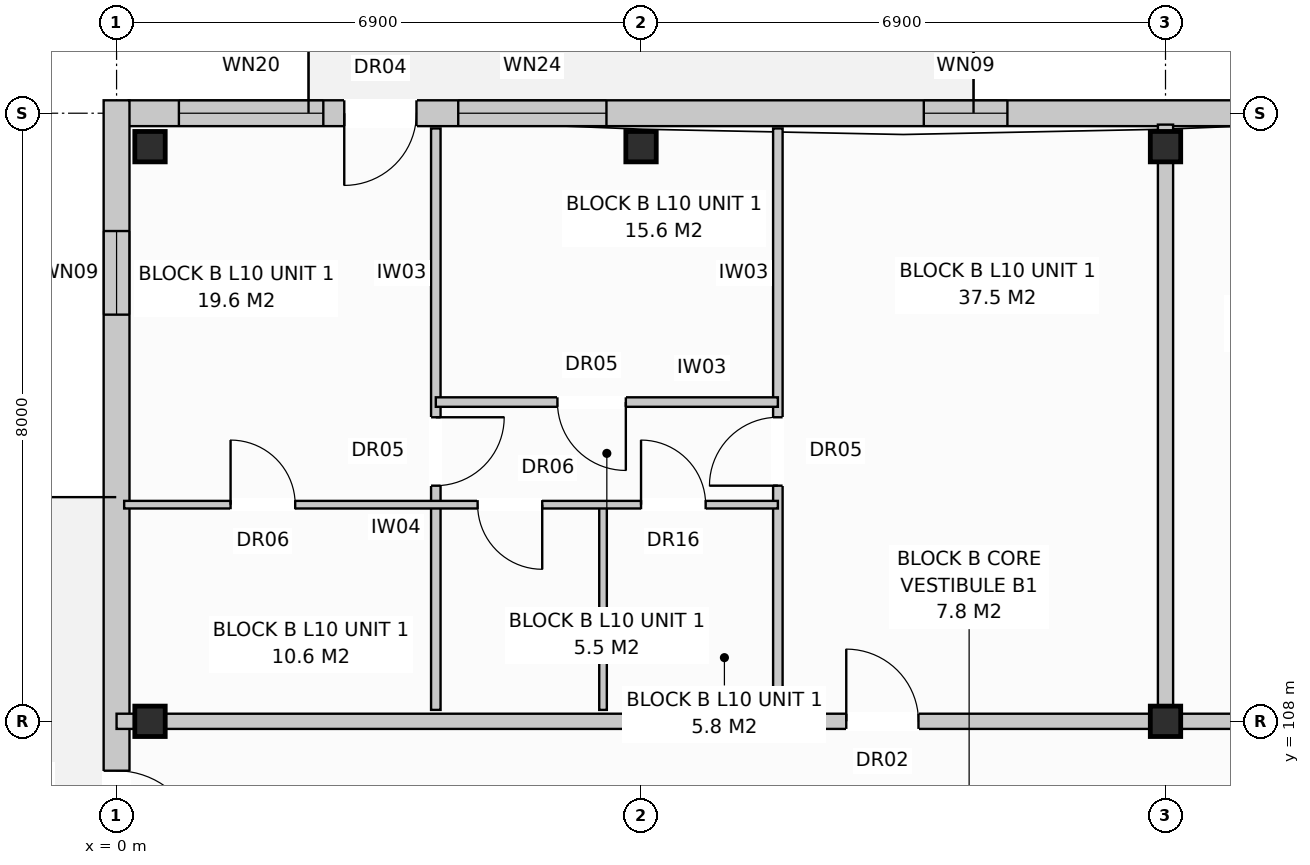
"""IFC4 building model, lengths in metres.
Left out: names, types, materials, properties, quantities, classifications, styles, units other than length and angle.
Written with IfcOpenShell. Run it as: python <this file> out.ifc"""

import sys

from ifc_helpers import new_model, si_unit, direction, frame, frame_2d, origin, origin_with_axes, origin_2d, place, context, subcontext, project, spatial, rectangle, extrude, element, fill, save


model = new_model("IFC4")
c1 = context("Model", 3, precision=1e-05, world=origin(), true_north=direction((0.0, 1.0)))
c2 = subcontext(c1, "Body", "Model", "MODEL_VIEW")
j1 = project(units=[si_unit("LENGTHUNIT", "METRE"), si_unit("PLANEANGLEUNIT", "RADIAN")], contexts=[c1])
p1 = place(None, origin())
s1 = spatial("IfcSite", under=j1, at=p1, CompositionType="ELEMENT")
p2 = place(p1, origin())
s2 = spatial("IfcBuilding", under=s1, at=p2, CompositionType="ELEMENT")
p3 = place(p2, frame((0.0, 0.0, 33.6)))
s3 = spatial("IfcBuildingStorey", under=s2, at=p3, CompositionType="ELEMENT", Elevation=33.6)
for number, where, z_axis, x_axis in (
    (1, (0.44, 108.0, 0.0), (0.0, 0.0, 1.0), (1.0, 0.0, 0.0)),
    (2, (0.44, 115.56, 0.0), (0.0, 0.0, 1.0), (1.0, 0.0, 0.0)),
    (3, (6.9, 108.0, 0.0), (0.0, 0.0, 1.0), (1.0, 0.0, 0.0)),
    (4, (6.9, 115.56, 0.0), (0.0, 0.0, 1.0), (1.0, 0.0, 0.0)),
    (5, (13.8, 108.0, 0.0), (0.0, 0.0, 1.0), (1.0, 0.0, 0.0)),
    (6, (13.8, 115.56, 0.0), (0.0, 0.0, 1.0), (1.0, 0.0, 0.0)),
):
    element("IfcColumn", number, at=place(p3, frame(where, z_axis=z_axis, x_axis=x_axis)), inside=s3, PredefinedType="COLUMN", context=c2, shape_type="SweptSolid", body=[
        extrude(rectangle(XDim=0.4, YDim=0.4, at=origin_2d()), origin(), (0.0, 0.0, 1.0), 3.2),
    ])
p4 = place(p3, frame((0.16, 116.0, 0.0), z_axis=(0.0, 0.0, 1.0), x_axis=(1.0, 0.0, 0.0)))
e7 = element("IfcWall", 7, at=p4, inside=s3, PredefinedType="STANDARD", context=c2, shape_type="SweptSolid", body=[
    extrude(rectangle(XDim=41.08, YDim=0.34, at=frame_2d((20.54, 0.0))), origin(), (0.0, 0.0, 1.0), 2.96),
])
p5 = place(p4, frame((2.835, 0.0, 0.0)))
e8 = element("IfcOpeningElement", 8, at=p5, cuts=e7, PredefinedType="OPENING", context=c2, shape_type="SweptSolid", body=[
    extrude(rectangle(XDim=0.95, YDim=2.1, at=frame_2d((0.475, 1.05))), frame((0.0, 0.182, 0.0), z_axis=(0.0, -1.0, 0.0), x_axis=(1.0, 0.0, 0.0)), (0.0, 0.0, 1.0), 0.364),
])
p6 = place(p4, frame((17.635, 0.0, 0.0)))
e9 = element("IfcOpeningElement", 9, at=p6, cuts=e7, PredefinedType="OPENING", context=c2, shape_type="SweptSolid", body=[
    extrude(rectangle(XDim=0.95, YDim=2.1, at=frame_2d((0.475, 1.05))), frame((0.0, 0.182, 0.0), z_axis=(0.0, -1.0, 0.0), x_axis=(1.0, 0.0, 0.0)), (0.0, 0.0, 1.0), 0.364),
])
p7 = place(p4, frame((30.135, 0.0, 0.0)))
e10 = element("IfcOpeningElement", 10, at=p7, cuts=e7, PredefinedType="OPENING", context=c2, shape_type="SweptSolid", body=[
    extrude(rectangle(XDim=0.95, YDim=2.1, at=frame_2d((0.475, 1.05))), frame((0.0, 0.182, 0.0), z_axis=(0.0, -1.0, 0.0), x_axis=(1.0, 0.0, 0.0)), (0.0, 0.0, 1.0), 0.364),
])
p8 = place(p4, frame((0.66, 0.0, 0.8)))
e11 = element("IfcOpeningElement", 11, at=p8, cuts=e7, PredefinedType="OPENING", context=c2, shape_type="SweptSolid", body=[
    extrude(rectangle(XDim=1.9, YDim=1.85, at=frame_2d((0.95, 0.925))), frame((0.0, 0.182, 0.0), z_axis=(0.0, -1.0, 0.0), x_axis=(1.0, 0.0, 0.0)), (0.0, 0.0, 1.0), 0.364),
])
p9 = place(p4, frame((4.335, 0.0, 0.8)))
e12 = element("IfcOpeningElement", 12, at=p9, cuts=e7, PredefinedType="OPENING", context=c2, shape_type="SweptSolid", body=[
    extrude(rectangle(XDim=1.95, YDim=1.65, at=frame_2d((0.975, 0.825))), frame((0.0, 0.182, 0.0), z_axis=(0.0, -1.0, 0.0), x_axis=(1.0, 0.0, 0.0)), (0.0, 0.0, 1.0), 0.364),
])
p10 = place(p4, frame((10.46, 0.0, 0.72)))
e13 = element("IfcOpeningElement", 13, at=p10, cuts=e7, PredefinedType="OPENING", context=c2, shape_type="SweptSolid", body=[
    extrude(rectangle(XDim=1.1, YDim=1.5, at=frame_2d((0.55, 0.75))), frame((0.0, 0.182, 0.0), z_axis=(0.0, -1.0, 0.0), x_axis=(1.0, 0.0, 0.0)), (0.0, 0.0, 1.0), 0.364),
])
p11 = place(p4, frame((15.76, 0.0, 0.72)))
e14 = element("IfcOpeningElement", 14, at=p11, cuts=e7, PredefinedType="OPENING", context=c2, shape_type="SweptSolid", body=[
    extrude(rectangle(XDim=1.1, YDim=1.5, at=frame_2d((0.55, 0.75))), frame((0.0, 0.182, 0.0), z_axis=(0.0, -1.0, 0.0), x_axis=(1.0, 0.0, 0.0)), (0.0, 0.0, 1.0), 0.364),
])
p12 = place(p4, frame((20.992, 0.0, 0.8)))
e15 = element("IfcOpeningElement", 15, at=p12, cuts=e7, PredefinedType="OPENING", context=c2, shape_type="SweptSolid", body=[
    extrude(rectangle(XDim=1.95, YDim=1.65, at=frame_2d((0.975, 0.825))), frame((0.0, 0.182, 0.0), z_axis=(0.0, -1.0, 0.0), x_axis=(1.0, 0.0, 0.0)), (0.0, 0.0, 1.0), 0.364),
])
p13 = place(p4, frame((24.66, 0.0, 0.72)))
e16 = element("IfcOpeningElement", 16, at=p13, cuts=e7, PredefinedType="OPENING", context=c2, shape_type="SweptSolid", body=[
    extrude(rectangle(XDim=1.1, YDim=1.5, at=frame_2d((0.55, 0.75))), frame((0.0, 0.182, 0.0), z_axis=(0.0, -1.0, 0.0), x_axis=(1.0, 0.0, 0.0)), (0.0, 0.0, 1.0), 0.364),
])
p14 = place(p4, frame((27.96, 0.0, 0.8)))
e17 = element("IfcOpeningElement", 17, at=p14, cuts=e7, PredefinedType="OPENING", context=c2, shape_type="SweptSolid", body=[
    extrude(rectangle(XDim=1.9, YDim=1.85, at=frame_2d((0.95, 0.925))), frame((0.0, 0.182, 0.0), z_axis=(0.0, -1.0, 0.0), x_axis=(1.0, 0.0, 0.0)), (0.0, 0.0, 1.0), 0.364),
])
p15 = place(p4, frame((31.835, 0.0, 0.8)))
e18 = element("IfcOpeningElement", 18, at=p15, cuts=e7, PredefinedType="OPENING", context=c2, shape_type="SweptSolid", body=[
    extrude(rectangle(XDim=1.95, YDim=1.65, at=frame_2d((0.975, 0.825))), frame((0.0, 0.182, 0.0), z_axis=(0.0, -1.0, 0.0), x_axis=(1.0, 0.0, 0.0)), (0.0, 0.0, 1.0), 0.364),
])
p16 = place(p4, frame((35.41, 0.0, 0.8)))
e19 = element("IfcOpeningElement", 19, at=p16, cuts=e7, PredefinedType="OPENING", context=c2, shape_type="SweptSolid", body=[
    extrude(rectangle(XDim=1.8, YDim=1.7, at=frame_2d((0.9, 0.85))), frame((0.0, 0.182, 0.0), z_axis=(0.0, -1.0, 0.0), x_axis=(1.0, 0.0, 0.0)), (0.0, 0.0, 1.0), 0.364),
])
p17 = place(p4, frame((38.575, 0.0, 0.8)))
e20 = element("IfcOpeningElement", 20, at=p17, cuts=e7, PredefinedType="OPENING", context=c2, shape_type="SweptSolid", body=[
    extrude(rectangle(XDim=1.9, YDim=1.85, at=frame_2d((0.95, 0.925))), frame((0.0, 0.182, 0.0), z_axis=(0.0, -1.0, 0.0), x_axis=(1.0, 0.0, 0.0)), (0.0, 0.0, 1.0), 0.364),
])
p18 = place(p3, frame((0.0, 97.43, 0.0), z_axis=(0.0, 0.0, 1.0), x_axis=(0.0, 1.0, 0.0)))
e21 = element("IfcWall", 21, at=p18, inside=s3, PredefinedType="STANDARD", context=c2, shape_type="SweptSolid", body=[
    extrude(rectangle(XDim=18.74, YDim=0.34, at=frame_2d((9.37, 0.0))), origin(), (0.0, 0.0, 1.0), 2.96),
])
p19 = place(p18, frame((8.82, 0.0, 0.0)))
e22 = element("IfcOpeningElement", 22, at=p19, cuts=e21, PredefinedType="OPENING", context=c2, shape_type="SweptSolid", body=[
    extrude(rectangle(XDim=1.1, YDim=2.1, at=frame_2d((0.55, 1.05))), frame((0.0, 0.182, 0.0), z_axis=(0.0, -1.0, 0.0), x_axis=(1.0, 0.0, 0.0)), (0.0, 0.0, 1.0), 0.364),
])
p20 = place(p18, frame((1.72, 0.0, 0.72)))
e23 = element("IfcOpeningElement", 23, at=p20, cuts=e21, PredefinedType="OPENING", context=c2, shape_type="SweptSolid", body=[
    extrude(rectangle(XDim=1.1, YDim=1.5, at=frame_2d((0.55, 0.75))), frame((0.0, 0.182, 0.0), z_axis=(0.0, -1.0, 0.0), x_axis=(1.0, 0.0, 0.0)), (0.0, 0.0, 1.0), 0.364),
])
p21 = place(p18, frame((15.92, 0.0, 0.72)))
e24 = element("IfcOpeningElement", 24, at=p21, cuts=e21, PredefinedType="OPENING", context=c2, shape_type="SweptSolid", body=[
    extrude(rectangle(XDim=1.1, YDim=1.5, at=frame_2d((0.55, 0.75))), frame((0.0, 0.182, 0.0), z_axis=(0.0, -1.0, 0.0), x_axis=(1.0, 0.0, 0.0)), (0.0, 0.0, 1.0), 0.364),
])
p22 = place(p3, frame((13.8, 108.15, 0.0), z_axis=(0.0, 0.0, 1.0), x_axis=(0.0, 1.0, 0.0)))
e25 = element("IfcWall", 25, at=p22, inside=s3, PredefinedType="PARTITIONING", context=c2, shape_type="SweptSolid", body=[
    extrude(rectangle(XDim=7.7, YDim=0.2, at=frame_2d((3.85, 0.0))), origin(), (0.0, 0.0, 1.0), 2.96),
])
p23 = place(p3, frame((0.0, 108.0, 0.0), z_axis=(0.0, 0.0, 1.0), x_axis=(1.0, 0.0, 0.0)))
e26 = element("IfcWall", 26, at=p23, inside=s3, PredefinedType="PARTITIONING", context=c2, shape_type="SweptSolid", body=[
    extrude(rectangle(XDim=13.8, YDim=0.2, at=frame_2d((6.9, 0.0))), origin(), (0.0, 0.0, 1.0), 2.4),
])
p24 = place(p23, frame((9.6, 0.0, 0.0)))
e27 = element("IfcOpeningElement", 27, at=p24, cuts=e26, PredefinedType="OPENING", context=c2, shape_type="SweptSolid", body=[
    extrude(rectangle(XDim=0.95, YDim=2.15, at=frame_2d((0.475, 1.075))), frame((0.0, 0.112, 0.0), z_axis=(0.0, -1.0, 0.0), x_axis=(1.0, 0.0, 0.0)), (0.0, 0.0, 1.0), 0.224),
])
p25 = place(p3, frame((8.7, 108.15, 0.0), z_axis=(0.0, 0.0, 1.0), x_axis=(0.0, 1.0, 0.0)))
e28 = element("IfcWall", 28, at=p25, inside=s3, PredefinedType="PARTITIONING", context=c2, shape_type="SweptSolid", body=[
    extrude(rectangle(XDim=7.65, YDim=0.125, at=frame_2d((3.825, 0.0))), origin(), (0.0, 0.0, 1.0), 2.96),
])
p26 = place(p25, frame((2.95, 0.0, 0.0)))
e29 = element("IfcOpeningElement", 29, at=p26, cuts=e28, PredefinedType="OPENING", context=c2, shape_type="SweptSolid", body=[
    extrude(rectangle(XDim=0.9, YDim=2.1, at=frame_2d((0.45, 1.05))), frame((0.0, 0.074, 0.0), z_axis=(0.0, -1.0, 0.0), x_axis=(1.0, 0.0, 0.0)), (0.0, 0.0, 1.0), 0.149),
])
p27 = place(p3, frame((4.2, 108.15, 0.0), z_axis=(0.0, 0.0, 1.0), x_axis=(0.0, 1.0, 0.0)))
e30 = element("IfcWall", 30, at=p27, inside=s3, PredefinedType="PARTITIONING", context=c2, shape_type="SweptSolid", body=[
    extrude(rectangle(XDim=7.65, YDim=0.125, at=frame_2d((3.825, 0.0))), origin(), (0.0, 0.0, 1.0), 2.96),
])
p28 = place(p27, frame((2.95, 0.0, 0.0)))
e31 = element("IfcOpeningElement", 31, at=p28, cuts=e30, PredefinedType="OPENING", context=c2, shape_type="SweptSolid", body=[
    extrude(rectangle(XDim=0.9, YDim=2.1, at=frame_2d((0.45, 1.05))), frame((0.0, 0.074, 0.0), z_axis=(0.0, -1.0, 0.0), x_axis=(1.0, 0.0, 0.0)), (0.0, 0.0, 1.0), 0.149),
])
p29 = place(p3, frame((6.4, 108.15, 0.0), z_axis=(0.0, 0.0, 1.0), x_axis=(0.0, 1.0, 0.0)))
e32 = element("IfcWall", 32, at=p29, inside=s3, PredefinedType="PARTITIONING", context=c2, shape_type="SweptSolid", body=[
    extrude(rectangle(XDim=2.7, YDim=0.1, at=frame_2d((1.35, 0.0))), origin(), (0.0, 0.0, 1.0), 2.96),
])
p30 = place(p3, frame((0.1, 110.85, 0.0), z_axis=(0.0, 0.0, 1.0), x_axis=(1.0, 0.0, 0.0)))
e33 = element("IfcWall", 33, at=p30, inside=s3, PredefinedType="PARTITIONING", context=c2, shape_type="SweptSolid", body=[
    extrude(rectangle(XDim=8.6, YDim=0.1, at=frame_2d((4.3, 0.0))), origin(), (0.0, 0.0, 1.0), 2.96),
])
p31 = place(p30, frame((1.4, 0.0, 0.0)))
e34 = element("IfcOpeningElement", 34, at=p31, cuts=e33, PredefinedType="OPENING", context=c2, shape_type="SweptSolid", body=[
    extrude(rectangle(XDim=0.85, YDim=2.05, at=frame_2d((0.425, 1.025))), frame((0.0, 0.062, 0.0), z_axis=(0.0, -1.0, 0.0), x_axis=(1.0, 0.0, 0.0)), (0.0, 0.0, 1.0), 0.124),
])
p32 = place(p30, frame((4.65, 0.0, 0.0)))
e35 = element("IfcOpeningElement", 35, at=p32, cuts=e33, PredefinedType="OPENING", context=c2, shape_type="SweptSolid", body=[
    extrude(rectangle(XDim=0.85, YDim=2.05, at=frame_2d((0.425, 1.025))), frame((0.0, 0.062, 0.0), z_axis=(0.0, -1.0, 0.0), x_axis=(1.0, 0.0, 0.0)), (0.0, 0.0, 1.0), 0.124),
])
p33 = place(p30, frame((6.8, 0.0, 0.0)))
e36 = element("IfcOpeningElement", 36, at=p33, cuts=e33, PredefinedType="OPENING", context=c2, shape_type="SweptSolid", body=[
    extrude(rectangle(XDim=0.85, YDim=2.1, at=frame_2d((0.425, 1.05))), frame((0.0, 0.062, 0.0), z_axis=(0.0, -1.0, 0.0), x_axis=(1.0, 0.0, 0.0)), (0.0, 0.0, 1.0), 0.124),
])
p34 = place(p3, frame((4.2, 112.2, 0.0), z_axis=(0.0, 0.0, 1.0), x_axis=(1.0, 0.0, 0.0)))
e37 = element("IfcWall", 37, at=p34, inside=s3, PredefinedType="PARTITIONING", context=c2, shape_type="SweptSolid", body=[
    extrude(rectangle(XDim=4.5, YDim=0.125, at=frame_2d((2.25, 0.0))), origin(), (0.0, 0.0, 1.0), 2.96),
])
p35 = place(p34, frame((1.6, 0.0, 0.0)))
e38 = element("IfcOpeningElement", 38, at=p35, cuts=e37, PredefinedType="OPENING", context=c2, shape_type="SweptSolid", body=[
    extrude(rectangle(XDim=0.9, YDim=2.1, at=frame_2d((0.45, 1.05))), frame((0.0, 0.074, 0.0), z_axis=(0.0, -1.0, 0.0), x_axis=(1.0, 0.0, 0.0)), (0.0, 0.0, 1.0), 0.149),
])
p36 = place(p3, frame((13.8, 108.0, 0.0), z_axis=(0.0, 0.0, 1.0), x_axis=(1.0, 0.0, 0.0)))
e39 = element("IfcWall", 39, at=p36, inside=s3, PredefinedType="PARTITIONING", context=c2, shape_type="SweptSolid", body=[
    extrude(rectangle(XDim=13.8, YDim=0.2, at=frame_2d((6.9, 0.0))), origin(), (0.0, 0.0, 1.0), 2.4),
])
p37 = place(p36, frame((2.4, 0.0, 0.0)))
e40 = element("IfcOpeningElement", 40, at=p37, cuts=e39, PredefinedType="OPENING", context=c2, shape_type="SweptSolid", body=[
    extrude(rectangle(XDim=0.95, YDim=2.15, at=frame_2d((0.475, 1.075))), frame((0.0, 0.112, 0.0), z_axis=(0.0, -1.0, 0.0), x_axis=(1.0, 0.0, 0.0)), (0.0, 0.0, 1.0), 0.224),
])
p38 = place(p5, frame((0.95, 0.0, 0.0), z_axis=(0.0, 0.0, 1.0), x_axis=(-1.0, 0.0, 0.0)))
e41 = element("IfcDoor", 41, at=p38, inside=s3, OperationType="SINGLE_SWING_LEFT", PredefinedType="DOOR", context=c2, shape_type="SweptSolid", body=[
    extrude(rectangle(XDim=0.95, YDim=2.1, at=frame_2d((0.475, 1.05))), frame((0.0, 0.025, 0.0), z_axis=(0.0, -1.0, 0.0), x_axis=(1.0, 0.0, 0.0)), (0.0, 0.0, 1.0), 0.05),
])
fill(e8, e41)
p39 = place(p8, origin_with_axes())
e42 = element("IfcWindow", 42, at=p39, inside=s3, PartitioningType="SINGLE_PANEL", PredefinedType="WINDOW", context=c2, shape_type="SweptSolid", body=[
    extrude(rectangle(XDim=1.9, YDim=1.85, at=frame_2d((0.95, 0.925))), frame((0.0, 0.03, 0.0), z_axis=(0.0, -1.0, 0.0), x_axis=(1.0, 0.0, 0.0)), (0.0, 0.0, 1.0), 0.06),
])
fill(e11, e42)
p40 = place(p9, origin_with_axes())
e43 = element("IfcWindow", 43, at=p40, inside=s3, PartitioningType="SINGLE_PANEL", PredefinedType="WINDOW", context=c2, shape_type="SweptSolid", body=[
    extrude(rectangle(XDim=1.95, YDim=1.65, at=frame_2d((0.975, 0.825))), frame((0.0, 0.03, 0.0), z_axis=(0.0, -1.0, 0.0), x_axis=(1.0, 0.0, 0.0)), (0.0, 0.0, 1.0), 0.06),
])
fill(e12, e43)
p41 = place(p10, origin_with_axes())
e44 = element("IfcWindow", 44, at=p41, inside=s3, PartitioningType="SINGLE_PANEL", PredefinedType="WINDOW", context=c2, shape_type="SweptSolid", body=[
    extrude(rectangle(XDim=1.1, YDim=1.5, at=frame_2d((0.55, 0.75))), frame((0.0, 0.03, 0.0), z_axis=(0.0, -1.0, 0.0), x_axis=(1.0, 0.0, 0.0)), (0.0, 0.0, 1.0), 0.06),
])
fill(e13, e44)
p42 = place(p19, frame((1.1, 0.0, 0.0), z_axis=(0.0, 0.0, 1.0), x_axis=(-1.0, 0.0, 0.0)))
e45 = element("IfcDoor", 45, at=p42, inside=s3, OperationType="SINGLE_SWING_LEFT", PredefinedType="DOOR", context=c2, shape_type="SweptSolid", body=[
    extrude(rectangle(XDim=1.1, YDim=2.1, at=frame_2d((0.55, 1.05))), frame((0.0, 0.025, 0.0), z_axis=(0.0, -1.0, 0.0), x_axis=(1.0, 0.0, 0.0)), (0.0, 0.0, 1.0), 0.05),
])
fill(e22, e45)
p43 = place(p21, origin_with_axes())
e46 = element("IfcWindow", 46, at=p43, inside=s3, PartitioningType="SINGLE_PANEL", PredefinedType="WINDOW", context=c2, shape_type="SweptSolid", body=[
    extrude(rectangle(XDim=1.1, YDim=1.5, at=frame_2d((0.55, 0.75))), frame((0.0, 0.03, 0.0), z_axis=(0.0, -1.0, 0.0), x_axis=(1.0, 0.0, 0.0)), (0.0, 0.0, 1.0), 0.06),
])
fill(e24, e46)
p44 = place(p24, origin_with_axes())
e47 = element("IfcDoor", 47, at=p44, inside=s3, OperationType="SINGLE_SWING_LEFT", PredefinedType="DOOR", context=c2, shape_type="SweptSolid", body=[
    extrude(rectangle(XDim=0.95, YDim=2.15, at=frame_2d((0.475, 1.075))), frame((0.0, 0.025, 0.0), z_axis=(0.0, -1.0, 0.0), x_axis=(1.0, 0.0, 0.0)), (0.0, 0.0, 1.0), 0.05),
])
fill(e27, e47)
p45 = place(p26, origin_with_axes())
e48 = element("IfcDoor", 48, at=p45, inside=s3, OperationType="SINGLE_SWING_LEFT", PredefinedType="DOOR", context=c2, shape_type="SweptSolid", body=[
    extrude(rectangle(XDim=0.9, YDim=2.1, at=frame_2d((0.45, 1.05))), frame((0.0, 0.025, 0.0), z_axis=(0.0, -1.0, 0.0), x_axis=(1.0, 0.0, 0.0)), (0.0, 0.0, 1.0), 0.05),
])
fill(e29, e48)
p46 = place(p28, frame((0.9, 0.0, 0.0), z_axis=(0.0, 0.0, 1.0), x_axis=(-1.0, 0.0, 0.0)))
e49 = element("IfcDoor", 49, at=p46, inside=s3, OperationType="SINGLE_SWING_RIGHT", PredefinedType="DOOR", context=c2, shape_type="SweptSolid", body=[
    extrude(rectangle(XDim=0.9, YDim=2.1, at=frame_2d((0.45, 1.05))), frame((0.0, 0.025, 0.0), z_axis=(0.0, -1.0, 0.0), x_axis=(1.0, 0.0, 0.0)), (0.0, 0.0, 1.0), 0.05),
])
fill(e31, e49)
p47 = place(p31, origin_with_axes())
e50 = element("IfcDoor", 50, at=p47, inside=s3, OperationType="SINGLE_SWING_LEFT", PredefinedType="DOOR", context=c2, shape_type="SweptSolid", body=[
    extrude(rectangle(XDim=0.85, YDim=2.05, at=frame_2d((0.425, 1.025))), frame((0.0, 0.025, 0.0), z_axis=(0.0, -1.0, 0.0), x_axis=(1.0, 0.0, 0.0)), (0.0, 0.0, 1.0), 0.05),
])
fill(e34, e50)
p48 = place(p32, frame((0.85, 0.0, 0.0), z_axis=(0.0, 0.0, 1.0), x_axis=(-1.0, 0.0, 0.0)))
e51 = element("IfcDoor", 51, at=p48, inside=s3, OperationType="SINGLE_SWING_RIGHT", PredefinedType="DOOR", context=c2, shape_type="SweptSolid", body=[
    extrude(rectangle(XDim=0.85, YDim=2.05, at=frame_2d((0.425, 1.025))), frame((0.0, 0.025, 0.0), z_axis=(0.0, -1.0, 0.0), x_axis=(1.0, 0.0, 0.0)), (0.0, 0.0, 1.0), 0.05),
])
fill(e35, e51)
p49 = place(p33, origin_with_axes())
e52 = element("IfcDoor", 52, at=p49, inside=s3, OperationType="SINGLE_SWING_LEFT", PredefinedType="DOOR", context=c2, shape_type="SweptSolid", body=[
    extrude(rectangle(XDim=0.85, YDim=2.1, at=frame_2d((0.425, 1.05))), frame((0.0, 0.025, 0.0), z_axis=(0.0, -1.0, 0.0), x_axis=(1.0, 0.0, 0.0)), (0.0, 0.0, 1.0), 0.05),
])
fill(e36, e52)
p50 = place(p35, frame((0.9, 0.0, 0.0), z_axis=(0.0, 0.0, 1.0), x_axis=(-1.0, 0.0, 0.0)))
e53 = element("IfcDoor", 53, at=p50, inside=s3, OperationType="SINGLE_SWING_RIGHT", PredefinedType="DOOR", context=c2, shape_type="SweptSolid", body=[
    extrude(rectangle(XDim=0.9, YDim=2.1, at=frame_2d((0.45, 1.05))), frame((0.0, 0.025, 0.0), z_axis=(0.0, -1.0, 0.0), x_axis=(1.0, 0.0, 0.0)), (0.0, 0.0, 1.0), 0.05),
])
fill(e38, e53)
save(model, sys.argv[1])
